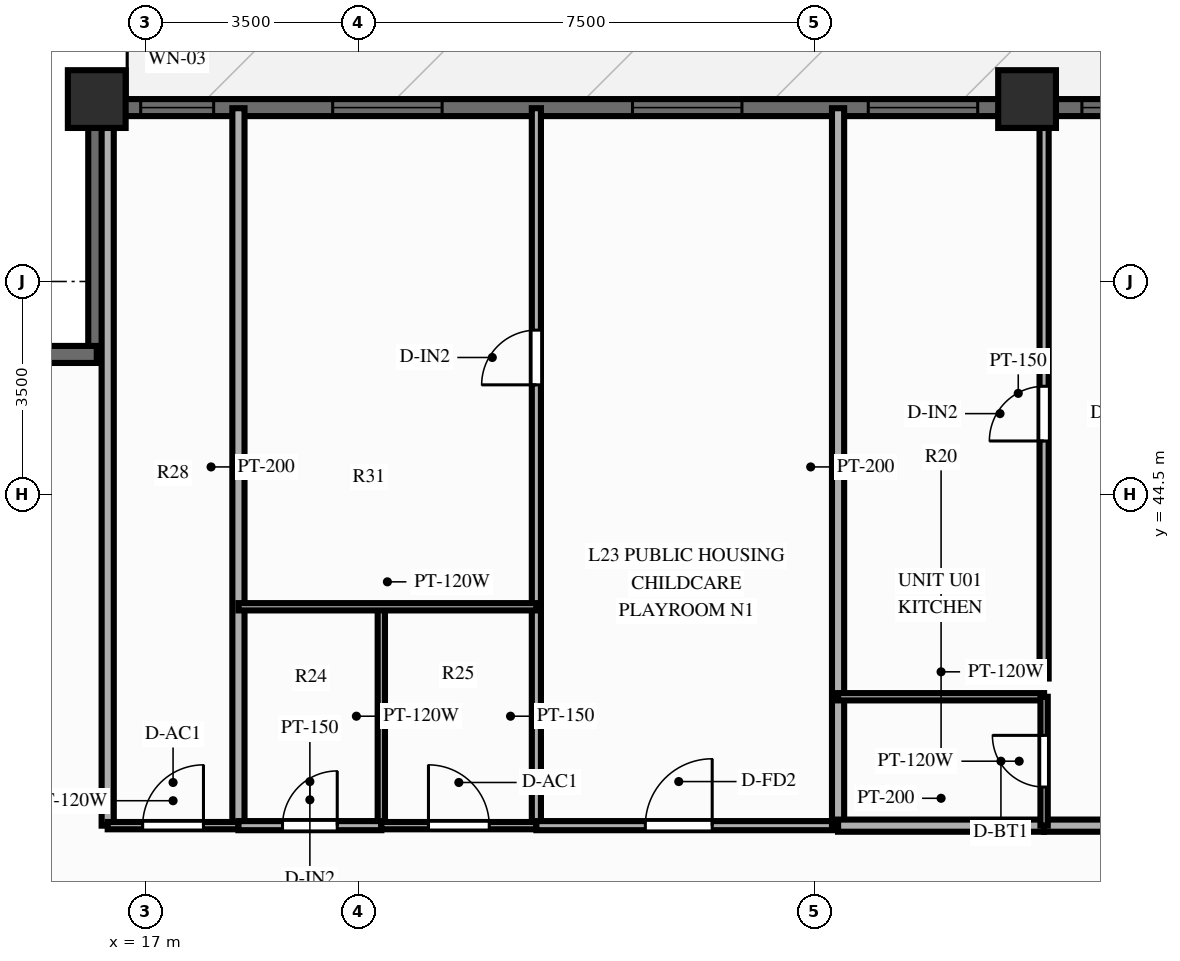
"""IFC4 building model, lengths in metres.
Left out: names, types, materials, properties, quantities, classifications, styles, units other than length and angle.
Written with IfcOpenShell. Run it as: python <this file> out.ifc"""

import sys

from ifc_helpers import new_model, si_unit, direction, frame, frame_2d, origin, origin_2d, place, context, subcontext, project, spatial, rectangle, extrude, source, transform, mapped, element, fill, save


model = new_model("IFC4")
c1 = context("Model", 3, precision=1e-05, world=origin(), true_north=direction((0.0, 1.0)))
c2 = subcontext(c1, "Body", "Model", "MODEL_VIEW")
j1 = project(units=[si_unit("LENGTHUNIT", "METRE"), si_unit("PLANEANGLEUNIT", "RADIAN")], contexts=[c1])
p1 = place(None, origin())
s1 = spatial("IfcSite", under=j1, at=p1, CompositionType="ELEMENT")
p2 = place(p1, origin())
s2 = spatial("IfcBuilding", under=s1, at=p2, CompositionType="ELEMENT")
p3 = place(p2, frame((0.0, 0.0, 74.35)))
s3 = spatial("IfcBuildingStorey", under=s2, at=p3, CompositionType="ELEMENT", Elevation=74.35)
m1 = source(origin(), c2, "Body", "SweptSolid", [
    extrude(rectangle(XDim=0.95, YDim=0.95, at=origin_2d()), origin(), (0.0, 0.0, 1.0), 3.5),
])
for number, where, z_axis, x_axis in (
    (1, (31.5, 51.0, 0.0), (0.0, 0.0, 1.0), (1.0, 0.0, 0.0)),
    (2, (16.2, 51.0, 0.0), (0.0, 0.0, 1.0), (1.0, 0.0, 0.0)),
):
    element("IfcColumn", number, at=place(p3, frame(where, z_axis=z_axis, x_axis=x_axis)), inside=s3, PredefinedType="COLUMN", context=c2, shape_type="MappedRepresentation", body=[
        mapped(m1, transform((0.0, 0.0, 0.0), scale=1.0)),
    ])
p4 = place(p3, frame((16.2, 50.86, 0.0), z_axis=(0.0, 0.0, 1.0), x_axis=(1.0, 0.0, 0.0)))
e3 = element("IfcWall", 3, at=p4, inside=s3, PredefinedType="SOLIDWALL", context=c2, shape_type="SweptSolid", body=[
    extrude(rectangle(XDim=43.6, YDim=0.28, at=frame_2d((21.8, 0.0))), origin(), (0.0, 0.0, 1.0), 2.78),
])
p5 = place(p4, frame((0.722, 0.0, 0.85)))
e4 = element("IfcOpeningElement", 4, at=p5, cuts=e3, PredefinedType="OPENING", context=c2, shape_type="SweptSolid", body=[
    extrude(rectangle(XDim=1.2, YDim=1.5, at=frame_2d((0.6, 0.75))), frame((0.0, 0.152, 0.0), z_axis=(0.0, -1.0, 0.0), x_axis=(1.0, 0.0, 0.0)), (0.0, 0.0, 1.0), 0.304),
])
p6 = place(p4, frame((3.88, 0.0, 0.85)))
e5 = element("IfcOpeningElement", 5, at=p6, cuts=e3, PredefinedType="OPENING", context=c2, shape_type="SweptSolid", body=[
    extrude(rectangle(XDim=1.8, YDim=1.65, at=frame_2d((0.9, 0.825))), frame((0.0, 0.152, 0.0), z_axis=(0.0, -1.0, 0.0), x_axis=(1.0, 0.0, 0.0)), (0.0, 0.0, 1.0), 0.304),
])
p7 = place(p4, frame((8.811, 0.0, 0.85)))
e6 = element("IfcOpeningElement", 6, at=p7, cuts=e3, PredefinedType="OPENING", context=c2, shape_type="SweptSolid", body=[
    extrude(rectangle(XDim=1.8, YDim=1.65, at=frame_2d((0.9, 0.825))), frame((0.0, 0.152, 0.0), z_axis=(0.0, -1.0, 0.0), x_axis=(1.0, 0.0, 0.0)), (0.0, 0.0, 1.0), 0.304),
])
p8 = place(p4, frame((12.688, 0.0, 0.85)))
e7 = element("IfcOpeningElement", 7, at=p8, cuts=e3, PredefinedType="OPENING", context=c2, shape_type="SweptSolid", body=[
    extrude(rectangle(XDim=1.8, YDim=1.65, at=frame_2d((0.9, 0.825))), frame((0.0, 0.152, 0.0), z_axis=(0.0, -1.0, 0.0), x_axis=(1.0, 0.0, 0.0)), (0.0, 0.0, 1.0), 0.304),
])
p9 = place(p4, frame((16.202, 0.0, 0.85)))
e8 = element("IfcOpeningElement", 8, at=p9, cuts=e3, PredefinedType="OPENING", context=c2, shape_type="SweptSolid", body=[
    extrude(rectangle(XDim=1.8, YDim=1.65, at=frame_2d((0.9, 0.825))), frame((0.0, 0.152, 0.0), z_axis=(0.0, -1.0, 0.0), x_axis=(1.0, 0.0, 0.0)), (0.0, 0.0, 1.0), 0.304),
])
p10 = place(p4, frame((19.421, 0.0, 0.85)))
e9 = element("IfcOpeningElement", 9, at=p10, cuts=e3, PredefinedType="OPENING", context=c2, shape_type="SweptSolid", body=[
    extrude(rectangle(XDim=1.8, YDim=1.65, at=frame_2d((0.9, 0.825))), frame((0.0, 0.152, 0.0), z_axis=(0.0, -1.0, 0.0), x_axis=(1.0, 0.0, 0.0)), (0.0, 0.0, 1.0), 0.304),
])
p11 = place(p4, frame((23.953, 0.0, 0.0)))
e10 = element("IfcOpeningElement", 10, at=p11, cuts=e3, PredefinedType="OPENING", context=c2, shape_type="SweptSolid", body=[
    extrude(rectangle(XDim=1.1, YDim=2.15, at=frame_2d((0.55, 1.075))), frame((0.0, 0.152, 0.0), z_axis=(0.0, -1.0, 0.0), x_axis=(1.0, 0.0, 0.0)), (0.0, 0.0, 1.0), 0.304),
])
p12 = place(p4, frame((29.776, 0.0, 0.85)))
e11 = element("IfcOpeningElement", 11, at=p12, cuts=e3, PredefinedType="OPENING", context=c2, shape_type="SweptSolid", body=[
    extrude(rectangle(XDim=1.8, YDim=1.65, at=frame_2d((0.9, 0.825))), frame((0.0, 0.152, 0.0), z_axis=(0.0, -1.0, 0.0), x_axis=(1.0, 0.0, 0.0)), (0.0, 0.0, 1.0), 0.304),
])
p13 = place(p4, frame((33.226, 0.0, 0.85)))
e12 = element("IfcOpeningElement", 12, at=p13, cuts=e3, PredefinedType="OPENING", context=c2, shape_type="SweptSolid", body=[
    extrude(rectangle(XDim=1.8, YDim=1.65, at=frame_2d((0.9, 0.825))), frame((0.0, 0.152, 0.0), z_axis=(0.0, -1.0, 0.0), x_axis=(1.0, 0.0, 0.0)), (0.0, 0.0, 1.0), 0.304),
])
p14 = place(p4, frame((36.858, 0.0, 0.85)))
e13 = element("IfcOpeningElement", 13, at=p14, cuts=e3, PredefinedType="OPENING", context=c2, shape_type="SweptSolid", body=[
    extrude(rectangle(XDim=1.8, YDim=1.65, at=frame_2d((0.9, 0.825))), frame((0.0, 0.152, 0.0), z_axis=(0.0, -1.0, 0.0), x_axis=(1.0, 0.0, 0.0)), (0.0, 0.0, 1.0), 0.304),
])
p15 = place(p4, frame((40.743, 0.0, 0.85)))
e14 = element("IfcOpeningElement", 14, at=p15, cuts=e3, PredefinedType="OPENING", context=c2, shape_type="SweptSolid", body=[
    extrude(rectangle(XDim=1.8, YDim=1.65, at=frame_2d((0.9, 0.825))), frame((0.0, 0.152, 0.0), z_axis=(0.0, -1.0, 0.0), x_axis=(1.0, 0.0, 0.0)), (0.0, 0.0, 1.0), 0.304),
])
for number, where, z_axis, x_axis in (
    (15, (16.2, 46.8, 0.0), (0.0, 0.0, 1.0), (0.0, 1.0, 0.0)),
    (16, (12.08, 46.8, 0.0), (0.0, 0.0, 1.0), (1.0, 0.0, 0.0)),
):
    element("IfcWall", number, at=place(p3, frame(where, z_axis=z_axis, x_axis=x_axis)), inside=s3, PredefinedType="SOLIDWALL", context=c2, shape_type="SweptSolid", body=[
        extrude(rectangle(XDim=4.12, YDim=0.28, at=frame_2d((2.06, 0.0))), origin(), (0.0, 0.0, 1.0), 2.78),
    ])
for number, where, z_axis, x_axis in (
    (17, (16.38, 39.05, 0.0), (0.0, 0.0, 1.0), (0.0, 1.0, 0.0)),
    (18, (18.53, 39.05, 0.0), (0.0, 0.0, 1.0), (0.0, 1.0, 0.0)),
):
    element("IfcWall", number, at=place(p3, frame(where, z_axis=z_axis, x_axis=x_axis)), inside=s3, PredefinedType="PARTITIONING", context=c2, shape_type="SweptSolid", body=[
        extrude(rectangle(XDim=11.8, YDim=0.2, at=frame_2d((5.9, 0.0))), origin(), (0.0, 0.0, 1.0), 3.29),
    ])
p16 = place(p3, frame((16.38, 39.05, 0.0), z_axis=(0.0, 0.0, 1.0), x_axis=(1.0, 0.0, 0.0)))
e19 = element("IfcWall", 19, at=p16, inside=s3, PredefinedType="PARTITIONING", context=c2, shape_type="SweptSolid", body=[
    extrude(rectangle(XDim=2.15, YDim=0.12, at=frame_2d((1.075, 0.0))), origin(), (0.0, 0.0, 1.0), 3.29),
])
p17 = place(p16, frame((0.575, 0.0, 0.0)))
e20 = element("IfcOpeningElement", 20, at=p17, cuts=e19, PredefinedType="OPENING", context=c2, shape_type="SweptSolid", body=[
    extrude(rectangle(XDim=1.0, YDim=2.1, at=frame_2d((0.5, 1.05))), frame((0.0, 0.072, 0.0), z_axis=(0.0, -1.0, 0.0), x_axis=(1.0, 0.0, 0.0)), (0.0, 0.0, 1.0), 0.144),
])
p18 = place(p3, frame((20.88, 39.05, 0.0), z_axis=(0.0, 0.0, 1.0), x_axis=(0.0, 1.0, 0.0)))
e21 = element("IfcWall", 21, at=p18, inside=s3, PredefinedType="PARTITIONING", context=c2, shape_type="SweptSolid", body=[
    extrude(rectangle(XDim=3.6, YDim=0.12, at=frame_2d((1.8, 0.0))), origin(), (0.0, 0.0, 1.0), 3.29),
])
p19 = place(p3, frame((23.43, 39.05, 0.0), z_axis=(0.0, 0.0, 1.0), x_axis=(0.0, 1.0, 0.0)))
e22 = element("IfcWall", 22, at=p19, inside=s3, PredefinedType="PARTITIONING", context=c2, shape_type="SweptSolid", body=[
    extrude(rectangle(XDim=3.6, YDim=0.15, at=frame_2d((1.8, 0.0))), origin(), (0.0, 0.0, 1.0), 3.29),
])
p20 = place(p3, frame((23.43, 42.65, 0.0), z_axis=(0.0, 0.0, 1.0), x_axis=(0.0, 1.0, 0.0)))
e23 = element("IfcWall", 23, at=p20, inside=s3, PredefinedType="PARTITIONING", context=c2, shape_type="SweptSolid", body=[
    extrude(rectangle(XDim=8.2, YDim=0.15, at=frame_2d((4.1, 0.0))), origin(), (0.0, 0.0, 1.0), 3.29),
])
p21 = place(p20, frame((3.65, 0.0, 0.0)))
e24 = element("IfcOpeningElement", 24, at=p21, cuts=e23, PredefinedType="OPENING", context=c2, shape_type="SweptSolid", body=[
    extrude(rectangle(XDim=0.9, YDim=2.1, at=frame_2d((0.45, 1.05))), frame((0.0, 0.087, 0.0), z_axis=(0.0, -1.0, 0.0), x_axis=(1.0, 0.0, 0.0)), (0.0, 0.0, 1.0), 0.174),
])
p22 = place(p3, frame((18.53, 42.65, 0.0), z_axis=(0.0, 0.0, 1.0), x_axis=(1.0, 0.0, 0.0)))
e25 = element("IfcWall", 25, at=p22, inside=s3, PredefinedType="PARTITIONING", context=c2, shape_type="SweptSolid", body=[
    extrude(rectangle(XDim=4.9, YDim=0.12, at=frame_2d((2.45, 0.0))), origin(), (0.0, 0.0, 1.0), 3.29),
])
p23 = place(p3, frame((18.53, 39.05, 0.0), z_axis=(0.0, 0.0, 1.0), x_axis=(1.0, 0.0, 0.0)))
e26 = element("IfcWall", 26, at=p23, inside=s3, PredefinedType="PARTITIONING", context=c2, shape_type="SweptSolid", body=[
    extrude(rectangle(XDim=2.35, YDim=0.15, at=frame_2d((1.175, 0.0))), origin(), (0.0, 0.0, 1.0), 3.29),
])
p24 = place(p23, frame((0.725, 0.0, 0.0)))
e27 = element("IfcOpeningElement", 27, at=p24, cuts=e26, PredefinedType="OPENING", context=c2, shape_type="SweptSolid", body=[
    extrude(rectangle(XDim=0.9, YDim=2.1, at=frame_2d((0.45, 1.05))), frame((0.0, 0.087, 0.0), z_axis=(0.0, -1.0, 0.0), x_axis=(1.0, 0.0, 0.0)), (0.0, 0.0, 1.0), 0.174),
])
p25 = place(p3, frame((20.88, 39.05, 0.0), z_axis=(0.0, 0.0, 1.0), x_axis=(1.0, 0.0, 0.0)))
e28 = element("IfcWall", 28, at=p25, inside=s3, PredefinedType="PARTITIONING", context=c2, shape_type="SweptSolid", body=[
    extrude(rectangle(XDim=2.55, YDim=0.12, at=frame_2d((1.275, 0.0))), origin(), (0.0, 0.0, 1.0), 3.29),
])
p26 = place(p25, frame((0.775, 0.0, 0.0)))
e29 = element("IfcOpeningElement", 29, at=p26, cuts=e28, PredefinedType="OPENING", context=c2, shape_type="SweptSolid", body=[
    extrude(rectangle(XDim=1.0, YDim=2.1, at=frame_2d((0.5, 1.05))), frame((0.0, 0.072, 0.0), z_axis=(0.0, -1.0, 0.0), x_axis=(1.0, 0.0, 0.0)), (0.0, 0.0, 1.0), 0.144),
])
p27 = place(p3, frame((23.43, 39.05, 0.0), z_axis=(0.0, 0.0, 1.0), x_axis=(1.0, 0.0, 0.0)))
e30 = element("IfcWall", 30, at=p27, inside=s3, PredefinedType="PARTITIONING", context=c2, shape_type="SweptSolid", body=[
    extrude(rectangle(XDim=4.962, YDim=0.15, at=frame_2d((2.481, 0.0))), origin(), (0.0, 0.0, 1.0), 3.29),
])
p28 = place(p27, frame((1.792, 0.0, 0.0)))
e31 = element("IfcOpeningElement", 31, at=p28, cuts=e30, PredefinedType="OPENING", context=c2, shape_type="SweptSolid", body=[
    extrude(rectangle(XDim=1.1, YDim=2.15, at=frame_2d((0.55, 1.075))), frame((0.0, 0.087, 0.0), z_axis=(0.0, -1.0, 0.0), x_axis=(1.0, 0.0, 0.0)), (0.0, 0.0, 1.0), 0.174),
])
p29 = place(p3, frame((28.392, 39.05, 0.0), z_axis=(0.0, 0.0, 1.0), x_axis=(0.0, 1.0, 0.0)))
e32 = element("IfcWall", 32, at=p29, inside=s3, PredefinedType="PARTITIONING", context=c2, shape_type="SweptSolid", body=[
    extrude(rectangle(XDim=11.8, YDim=0.2, at=frame_2d((5.9, 0.0))), origin(), (0.0, 0.0, 1.0), 3.29),
])
p30 = place(p3, frame((28.392, 39.05, 0.0), z_axis=(0.0, 0.0, 1.0), x_axis=(1.0, 0.0, 0.0)))
e33 = element("IfcWall", 33, at=p30, inside=s3, PredefinedType="PARTITIONING", context=c2, shape_type="SweptSolid", body=[
    extrude(rectangle(XDim=3.388, YDim=0.2, at=frame_2d((1.694, 0.0))), origin(), (0.0, 0.0, 1.0), 3.29),
])
p31 = place(p3, frame((31.78, 39.05, 0.0), z_axis=(0.0, 0.0, 1.0), x_axis=(1.0, 0.0, 0.0)))
e34 = element("IfcWall", 34, at=p31, inside=s3, PredefinedType="PARTITIONING", context=c2, shape_type="SweptSolid", body=[
    extrude(rectangle(XDim=3.008, YDim=0.2, at=frame_2d((1.504, 0.0))), origin(), (0.0, 0.0, 1.0), 3.29),
])
p32 = place(p31, frame((1.004, 0.0, 0.0)))
e35 = element("IfcOpeningElement", 35, at=p32, cuts=e34, PredefinedType="OPENING", context=c2, shape_type="SweptSolid", body=[
    extrude(rectangle(XDim=1.0, YDim=2.15, at=frame_2d((0.5, 1.075))), frame((0.0, 0.112, 0.0), z_axis=(0.0, -1.0, 0.0), x_axis=(1.0, 0.0, 0.0)), (0.0, 0.0, 1.0), 0.224),
])
p33 = place(p3, frame((28.392, 41.17, 0.0), z_axis=(0.0, 0.0, 1.0), x_axis=(1.0, 0.0, 0.0)))
e36 = element("IfcWall", 36, at=p33, inside=s3, PredefinedType="PARTITIONING", context=c2, shape_type="SweptSolid", body=[
    extrude(rectangle(XDim=3.388, YDim=0.12, at=frame_2d((1.694, 0.0))), origin(), (0.0, 0.0, 1.0), 3.29),
])
p34 = place(p3, frame((31.78, 39.05, 0.0), z_axis=(0.0, 0.0, 1.0), x_axis=(0.0, 1.0, 0.0)))
e37 = element("IfcWall", 37, at=p34, inside=s3, PredefinedType="PARTITIONING", context=c2, shape_type="SweptSolid", body=[
    extrude(rectangle(XDim=2.12, YDim=0.12, at=frame_2d((1.06, 0.0))), origin(), (0.0, 0.0, 1.0), 3.29),
])
p35 = place(p34, frame((0.635, 0.0, 0.0)))
e38 = element("IfcOpeningElement", 38, at=p35, cuts=e37, PredefinedType="OPENING", context=c2, shape_type="SweptSolid", body=[
    extrude(rectangle(XDim=0.85, YDim=2.05, at=frame_2d((0.425, 1.025))), frame((0.0, 0.072, 0.0), z_axis=(0.0, -1.0, 0.0), x_axis=(1.0, 0.0, 0.0)), (0.0, 0.0, 1.0), 0.144),
])
p36 = place(p3, frame((31.78, 41.47, 0.0), z_axis=(0.0, 0.0, 1.0), x_axis=(0.0, 1.0, 0.0)))
e39 = element("IfcWall", 39, at=p36, inside=s3, PredefinedType="PARTITIONING", context=c2, shape_type="SweptSolid", body=[
    extrude(rectangle(XDim=9.38, YDim=0.15, at=frame_2d((4.69, 0.0))), origin(), (0.0, 0.0, 1.0), 3.29),
])
p37 = place(p36, frame((3.907, 0.0, 0.0)))
e40 = element("IfcOpeningElement", 40, at=p37, cuts=e39, PredefinedType="OPENING", context=c2, shape_type="SweptSolid", body=[
    extrude(rectangle(XDim=0.9, YDim=2.1, at=frame_2d((0.45, 1.05))), frame((0.0, 0.087, 0.0), z_axis=(0.0, -1.0, 0.0), x_axis=(1.0, 0.0, 0.0)), (0.0, 0.0, 1.0), 0.174),
])
m2 = source(origin(), c2, "Body", "SweptSolid", [
    extrude(rectangle(XDim=1.2, YDim=1.5, at=frame_2d((0.6, 0.75))), frame((0.0, 0.03, 0.0), z_axis=(0.0, -1.0, 0.0), x_axis=(1.0, 0.0, 0.0)), (0.0, 0.0, 1.0), 0.06),
])
p38 = place(p5, origin())
e41 = element("IfcWindow", 41, at=p38, inside=s3, PartitioningType="SINGLE_PANEL", PredefinedType="WINDOW", context=c2, shape_type="MappedRepresentation", body=[
    mapped(m2, transform((0.0, 0.0, 0.0), scale=1.0)),
])
fill(e4, e41)
m3 = source(origin(), c2, "Body", "SweptSolid", [
    extrude(rectangle(XDim=1.8, YDim=1.65, at=frame_2d((0.9, 0.825))), frame((0.0, 0.03, 0.0), z_axis=(0.0, -1.0, 0.0), x_axis=(1.0, 0.0, 0.0)), (0.0, 0.0, 1.0), 0.06),
])
p39 = place(p6, origin())
e42 = element("IfcWindow", 42, at=p39, inside=s3, PartitioningType="SINGLE_PANEL", PredefinedType="WINDOW", context=c2, shape_type="MappedRepresentation", body=[
    mapped(m3, transform((0.0, 0.0, 0.0), scale=1.0)),
])
fill(e5, e42)
p40 = place(p7, origin())
e43 = element("IfcWindow", 43, at=p40, inside=s3, PartitioningType="SINGLE_PANEL", PredefinedType="WINDOW", context=c2, shape_type="MappedRepresentation", body=[
    mapped(m3, transform((0.0, 0.0, 0.0), scale=1.0)),
])
fill(e6, e43)
p41 = place(p8, origin())
e44 = element("IfcWindow", 44, at=p41, inside=s3, PartitioningType="SINGLE_PANEL", PredefinedType="WINDOW", context=c2, shape_type="MappedRepresentation", body=[
    mapped(m3, transform((0.0, 0.0, 0.0), scale=1.0)),
])
fill(e7, e44)
p42 = place(p9, origin())
e45 = element("IfcWindow", 45, at=p42, inside=s3, PartitioningType="SINGLE_PANEL", PredefinedType="WINDOW", context=c2, shape_type="MappedRepresentation", body=[
    mapped(m3, transform((0.0, 0.0, 0.0), scale=1.0)),
])
fill(e8, e45)
m4 = source(origin(), c2, "Body", "SweptSolid", [
    extrude(rectangle(XDim=1.0, YDim=2.1, at=frame_2d((0.5, 1.05))), frame((0.0, 0.025, 0.0), z_axis=(0.0, -1.0, 0.0), x_axis=(1.0, 0.0, 0.0)), (0.0, 0.0, 1.0), 0.05),
])
p43 = place(p17, origin())
e46 = element("IfcDoor", 46, at=p43, inside=s3, OperationType="SINGLE_SWING_RIGHT", PredefinedType="DOOR", context=c2, shape_type="MappedRepresentation", body=[
    mapped(m4, transform((0.0, 0.0, 0.0), scale=1.0)),
])
fill(e20, e46)
m5 = source(origin(), c2, "Body", "SweptSolid", [
    extrude(rectangle(XDim=0.9, YDim=2.1, at=frame_2d((0.45, 1.05))), frame((0.0, 0.025, 0.0), z_axis=(0.0, -1.0, 0.0), x_axis=(1.0, 0.0, 0.0)), (0.0, 0.0, 1.0), 0.05),
])
p44 = place(p21, origin())
e47 = element("IfcDoor", 47, at=p44, inside=s3, OperationType="SINGLE_SWING_LEFT", PredefinedType="DOOR", context=c2, shape_type="MappedRepresentation", body=[
    mapped(m5, transform((0.0, 0.0, 0.0), scale=1.0)),
])
fill(e24, e47)
p45 = place(p24, origin())
e48 = element("IfcDoor", 48, at=p45, inside=s3, OperationType="SINGLE_SWING_RIGHT", PredefinedType="DOOR", context=c2, shape_type="MappedRepresentation", body=[
    mapped(m5, transform((0.0, 0.0, 0.0), scale=1.0)),
])
fill(e27, e48)
p46 = place(p26, origin())
e49 = element("IfcDoor", 49, at=p46, inside=s3, OperationType="SINGLE_SWING_LEFT", PredefinedType="DOOR", context=c2, shape_type="MappedRepresentation", body=[
    mapped(m4, transform((0.0, 0.0, 0.0), scale=1.0)),
])
fill(e29, e49)
m6 = source(origin(), c2, "Body", "SweptSolid", [
    extrude(rectangle(XDim=1.1, YDim=2.15, at=frame_2d((0.55, 1.075))), frame((0.0, 0.025, 0.0), z_axis=(0.0, -1.0, 0.0), x_axis=(1.0, 0.0, 0.0)), (0.0, 0.0, 1.0), 0.05),
])
p47 = place(p28, origin())
e50 = element("IfcDoor", 50, at=p47, inside=s3, OperationType="SINGLE_SWING_RIGHT", PredefinedType="DOOR", context=c2, shape_type="MappedRepresentation", body=[
    mapped(m6, transform((0.0, 0.0, 0.0), scale=1.0)),
])
fill(e31, e50)
m7 = source(origin(), c2, "Body", "SweptSolid", [
    extrude(rectangle(XDim=0.85, YDim=2.05, at=frame_2d((0.425, 1.025))), frame((0.0, 0.025, 0.0), z_axis=(0.0, -1.0, 0.0), x_axis=(1.0, 0.0, 0.0)), (0.0, 0.0, 1.0), 0.05),
])
p48 = place(p35, origin())
e51 = element("IfcDoor", 51, at=p48, inside=s3, OperationType="SINGLE_SWING_RIGHT", PredefinedType="DOOR", context=c2, shape_type="MappedRepresentation", body=[
    mapped(m7, transform((0.0, 0.0, 0.0), scale=1.0)),
])
fill(e38, e51)
p49 = place(p37, origin())
e52 = element("IfcDoor", 52, at=p49, inside=s3, OperationType="SINGLE_SWING_LEFT", PredefinedType="DOOR", context=c2, shape_type="MappedRepresentation", body=[
    mapped(m5, transform((0.0, 0.0, 0.0), scale=1.0)),
])
fill(e40, e52)
save(model, sys.argv[1])
